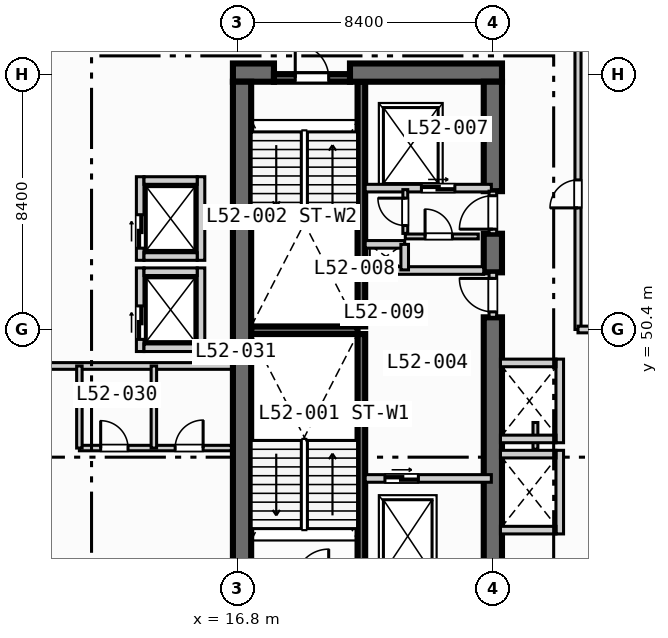
"""IFC4 building model, lengths in metres.
Left out: names, types, materials, properties, quantities, classifications, styles, units other than length and angle.
Written with IfcOpenShell. Run it as: python <this file> out.ifc"""

import sys

from ifc_helpers import new_model, si_unit, direction, frame, frame_2d, origin, place, context, subcontext, project, spatial, rectangle, extrude, element, fill, save


model = new_model("IFC4")
c1 = context("Model", 3, precision=1e-05, world=origin(), true_north=direction((0.0, 1.0)))
c2 = subcontext(c1, "Body", "Model", "MODEL_VIEW")
j1 = project(units=[si_unit("LENGTHUNIT", "METRE"), si_unit("PLANEANGLEUNIT", "RADIAN")], contexts=[c1])
p1 = place(None, origin())
s1 = spatial("IfcSite", under=j1, at=p1, CompositionType="ELEMENT")
p2 = place(p1, origin())
s2 = spatial("IfcBuilding", under=s1, at=p2, CompositionType="ELEMENT")
p3 = place(p2, frame((0.0, 0.0, 212.4)))
s3 = spatial("IfcBuildingStorey", under=s2, at=p3, CompositionType="ELEMENT", Elevation=212.4)
for number, where, z_axis, x_axis in (
    (1, (20.875, 42.2, 0.0), (0.0, 0.0, 1.0), (0.0, 1.0, 0.0)),
    (2, (20.875, 50.5, 0.0), (0.0, 0.0, 1.0), (0.0, 1.0, 0.0)),
):
    element("IfcWall", number, at=place(p3, frame(where, z_axis=z_axis, x_axis=x_axis)), inside=s3, PredefinedType="SOLIDWALL", context=c2, shape_type="SweptSolid", body=[
        extrude(rectangle(XDim=8.05, YDim=0.25, at=frame_2d((4.025, 0.0))), origin(), (0.0, 0.0, 1.0), 3.47),
    ])
p4 = place(p3, frame((17.25, 50.375, 0.0), z_axis=(0.0, 0.0, 1.0), x_axis=(1.0, 0.0, 0.0)))
e3 = element("IfcWall", 3, at=p4, inside=s3, PredefinedType="SOLIDWALL", context=c2, shape_type="SweptSolid", body=[
    extrude(rectangle(XDim=3.5, YDim=0.25, at=frame_2d((1.75, 0.0))), origin(), (0.0, 0.0, 1.0), 3.47),
])
p5 = place(p3, frame((16.65, 58.85, 0.0), z_axis=(0.0, 0.0, 1.0), x_axis=(1.0, 0.0, 0.0)))
e4 = element("IfcWall", 4, at=p5, inside=s3, PredefinedType="SHEAR", context=c2, shape_type="SweptSolid", body=[
    extrude(rectangle(XDim=1.35, YDim=0.6, at=frame_2d((0.675, 0.0))), origin(), (0.0, 0.0, 1.0), 3.47),
])
p6 = place(p3, frame((20.5, 58.85, 0.0), z_axis=(0.0, 0.0, 1.0), x_axis=(1.0, 0.0, 0.0)))
e5 = element("IfcWall", 5, at=p6, inside=s3, PredefinedType="SHEAR", context=c2, shape_type="SweptSolid", body=[
    extrude(rectangle(XDim=5.0, YDim=0.6, at=frame_2d((2.5, 0.0))), origin(), (0.0, 0.0, 1.0), 3.47),
])
p7 = place(p3, frame((16.95, 42.2, 0.0), z_axis=(0.0, 0.0, 1.0), x_axis=(0.0, 1.0, 0.0)))
e6 = element("IfcWall", 6, at=p7, inside=s3, PredefinedType="SHEAR", context=c2, shape_type="SweptSolid", body=[
    extrude(rectangle(XDim=16.35, YDim=0.6, at=frame_2d((8.175, 0.0))), origin(), (0.0, 0.0, 1.0), 3.47),
])
p8 = place(p3, frame((25.2, 42.2, 0.0), z_axis=(0.0, 0.0, 1.0), x_axis=(0.0, 1.0, 0.0)))
e7 = element("IfcWall", 7, at=p8, inside=s3, PredefinedType="SHEAR", context=c2, shape_type="SweptSolid", body=[
    extrude(rectangle(XDim=8.6, YDim=0.6, at=frame_2d((4.3, 0.0))), origin(), (0.0, 0.0, 1.0), 3.47),
])
p9 = place(p3, frame((25.2, 52.28, 0.0), z_axis=(0.0, 0.0, 1.0), x_axis=(0.0, 1.0, 0.0)))
e8 = element("IfcWall", 8, at=p9, inside=s3, PredefinedType="SHEAR", context=c2, shape_type="SweptSolid", body=[
    extrude(rectangle(XDim=1.27, YDim=0.6, at=frame_2d((0.635, 0.0))), origin(), (0.0, 0.0, 1.0), 3.47),
])
p10 = place(p3, frame((25.2, 54.95, 0.0), z_axis=(0.0, 0.0, 1.0), x_axis=(0.0, 1.0, 0.0)))
e9 = element("IfcWall", 9, at=p10, inside=s3, PredefinedType="SHEAR", context=c2, shape_type="SweptSolid", body=[
    extrude(rectangle(XDim=3.6, YDim=0.6, at=frame_2d((1.8, 0.0))), origin(), (0.0, 0.0, 1.0), 3.47),
])
p11 = place(p3, frame((18.0, 58.675, 0.0), z_axis=(0.0, 0.0, 1.0), x_axis=(1.0, 0.0, 0.0)))
e10 = element("IfcWall", 10, at=p11, inside=s3, PredefinedType="SOLIDWALL", context=c2, shape_type="SweptSolid", body=[
    extrude(rectangle(XDim=2.5, YDim=0.25, at=frame_2d((1.25, 0.0))), origin(), (0.0, 0.0, 1.0), 3.47),
])
p12 = place(p11, frame((0.7, 0.0, 0.0)))
e11 = element("IfcOpeningElement", 11, at=p12, cuts=e10, PredefinedType="OPENING", context=c2, shape_type="SweptSolid", body=[
    extrude(rectangle(XDim=1.1, YDim=2.15, at=frame_2d((0.55, 1.075))), frame((0.0, 0.135, 0.0), z_axis=(0.0, -1.0, 0.0), x_axis=(1.0, 0.0, 0.0)), (0.0, 0.0, 1.0), 0.27),
])
p13 = place(p3, frame((21.0, 45.5, 0.0), z_axis=(0.0, 0.0, 1.0), x_axis=(1.0, 0.0, 0.0)))
e12 = element("IfcWall", 12, at=p13, inside=s3, PredefinedType="SOLIDWALL", context=c2, shape_type="SweptSolid", body=[
    extrude(rectangle(XDim=4.15, YDim=0.25, at=frame_2d((2.075, 0.0))), origin(), (0.0, 0.0, 1.0), 3.47),
])
p14 = place(p13, frame((0.65, 0.0, 0.0)))
e13 = element("IfcOpeningElement", 13, at=p14, cuts=e12, PredefinedType="OPENING", context=c2, shape_type="SweptSolid", body=[
    extrude(rectangle(XDim=1.1, YDim=2.15, at=frame_2d((0.55, 1.075))), frame((0.0, 0.135, 0.0), z_axis=(0.0, -1.0, 0.0), x_axis=(1.0, 0.0, 0.0)), (0.0, 0.0, 1.0), 0.27),
])
p15 = place(p3, frame((25.2, 50.8, 0.0), z_axis=(0.0, 0.0, 1.0), x_axis=(0.0, 1.0, 0.0)))
e14 = element("IfcWall", 14, at=p15, inside=s3, PredefinedType="SOLIDWALL", context=c2, shape_type="SweptSolid", body=[
    extrude(rectangle(XDim=1.48, YDim=0.25, at=frame_2d((0.74, 0.0))), origin(), (0.0, 0.0, 1.0), 3.47),
])
p16 = place(p15, frame((0.18, 0.0, 0.0)))
e15 = element("IfcOpeningElement", 15, at=p16, cuts=e14, PredefinedType="OPENING", context=c2, shape_type="SweptSolid", body=[
    extrude(rectangle(XDim=1.1, YDim=2.15, at=frame_2d((0.55, 1.075))), frame((0.0, 0.135, 0.0), z_axis=(0.0, -1.0, 0.0), x_axis=(1.0, 0.0, 0.0)), (0.0, 0.0, 1.0), 0.27),
])
p17 = place(p3, frame((21.0, 52.34, 0.0), z_axis=(0.0, 0.0, 1.0), x_axis=(1.0, 0.0, 0.0)))
e16 = element("IfcWall", 16, at=p17, inside=s3, PredefinedType="SOLIDWALL", context=c2, shape_type="SweptSolid", body=[
    extrude(rectangle(XDim=3.9, YDim=0.25, at=frame_2d((1.95, 0.0))), origin(), (0.0, 0.0, 1.0), 3.47),
])
p18 = place(p3, frame((21.0, 55.05, 0.0), z_axis=(0.0, 0.0, 1.0), x_axis=(1.0, 0.0, 0.0)))
e17 = element("IfcWall", 17, at=p18, inside=s3, PredefinedType="SOLIDWALL", context=c2, shape_type="SweptSolid", body=[
    extrude(rectangle(XDim=4.15, YDim=0.25, at=frame_2d((2.075, 0.0))), origin(), (0.0, 0.0, 1.0), 3.47),
])
p19 = place(p18, frame((1.85, 0.0, 0.0)))
e18 = element("IfcOpeningElement", 18, at=p19, cuts=e17, PredefinedType="OPENING", context=c2, shape_type="SweptSolid", body=[
    extrude(rectangle(XDim=1.1, YDim=2.15, at=frame_2d((0.55, 1.075))), frame((0.0, 0.135, 0.0), z_axis=(0.0, -1.0, 0.0), x_axis=(1.0, 0.0, 0.0)), (0.0, 0.0, 1.0), 0.27),
])
p20 = place(p3, frame((25.2, 53.55, 0.0), z_axis=(0.0, 0.0, 1.0), x_axis=(0.0, 1.0, 0.0)))
e19 = element("IfcWall", 19, at=p20, inside=s3, PredefinedType="SOLIDWALL", context=c2, shape_type="SweptSolid", body=[
    extrude(rectangle(XDim=1.4, YDim=0.25, at=frame_2d((0.7, 0.0))), origin(), (0.0, 0.0, 1.0), 3.47),
])
p21 = place(p20, frame((0.15, 0.0, 0.0)))
e20 = element("IfcOpeningElement", 20, at=p21, cuts=e19, PredefinedType="OPENING", context=c2, shape_type="SweptSolid", body=[
    extrude(rectangle(XDim=1.1, YDim=2.15, at=frame_2d((0.55, 1.075))), frame((0.0, 0.135, 0.0), z_axis=(0.0, -1.0, 0.0), x_axis=(1.0, 0.0, 0.0)), (0.0, 0.0, 1.0), 0.27),
])
p22 = place(p3, frame((21.0, 53.2, 0.0), z_axis=(0.0, 0.0, 1.0), x_axis=(1.0, 0.0, 0.0)))
e21 = element("IfcWall", 21, at=p22, inside=s3, PredefinedType="SOLIDWALL", context=c2, shape_type="SweptSolid", body=[
    extrude(rectangle(XDim=1.3, YDim=0.25, at=frame_2d((0.65, 0.0))), origin(), (0.0, 0.0, 1.0), 3.47),
])
p23 = place(p3, frame((22.3, 52.36, 0.0), z_axis=(0.0, 0.0, 1.0), x_axis=(0.0, 1.0, 0.0)))
e22 = element("IfcWall", 22, at=p23, inside=s3, PredefinedType="SOLIDWALL", context=c2, shape_type="SweptSolid", body=[
    extrude(rectangle(XDim=0.84, YDim=0.25, at=frame_2d((0.42, 0.0))), origin(), (0.0, 0.0, 1.0), 3.47),
])
p24 = place(p3, frame((22.32, 53.56, 0.0), z_axis=(0.0, 0.0, 1.0), x_axis=(0.0, 1.0, 0.0)))
e23 = element("IfcWall", 23, at=p24, inside=s3, PredefinedType="PARTITIONING", context=c2, shape_type="SweptSolid", body=[
    extrude(rectangle(XDim=1.44, YDim=0.16, at=frame_2d((0.72, 0.0))), origin(), (0.0, 0.0, 1.0), 3.47),
])
p25 = place(p24, frame((0.26, 0.0, 0.0)))
e24 = element("IfcOpeningElement", 24, at=p25, cuts=e23, PredefinedType="OPENING", context=c2, shape_type="SweptSolid", body=[
    extrude(rectangle(XDim=0.9, YDim=2.1, at=frame_2d((0.45, 1.05))), frame((0.0, 0.09, 0.0), z_axis=(0.0, -1.0, 0.0), x_axis=(1.0, 0.0, 0.0)), (0.0, 0.0, 1.0), 0.18),
])
p26 = place(p3, frame((22.32, 53.46, 0.0), z_axis=(0.0, 0.0, 1.0), x_axis=(1.0, 0.0, 0.0)))
e25 = element("IfcWall", 25, at=p26, inside=s3, PredefinedType="PARTITIONING", context=c2, shape_type="SweptSolid", body=[
    extrude(rectangle(XDim=2.4, YDim=0.16, at=frame_2d((1.2, 0.0))), origin(), (0.0, 0.0, 1.0), 3.47),
])
p27 = place(p26, frame((0.65, 0.0, 0.0)))
e26 = element("IfcOpeningElement", 26, at=p27, cuts=e25, PredefinedType="OPENING", context=c2, shape_type="SweptSolid", body=[
    extrude(rectangle(XDim=0.9, YDim=2.1, at=frame_2d((0.45, 1.05))), frame((0.0, 0.09, 0.0), z_axis=(0.0, -1.0, 0.0), x_axis=(1.0, 0.0, 0.0)), (0.0, 0.0, 1.0), 0.18),
])
p28 = place(p3, frame((13.6, 49.675, 0.0), z_axis=(0.0, 0.0, 1.0), x_axis=(0.0, 1.0, 0.0)))
e27 = element("IfcWall", 27, at=p28, inside=s3, PredefinedType="SOLIDWALL", context=c2, shape_type="SweptSolid", body=[
    extrude(rectangle(XDim=2.75, YDim=0.25, at=frame_2d((1.375, 0.0))), origin(), (0.0, 0.0, 1.0), 3.47),
])
p29 = place(p28, frame((0.4, 0.0, 0.0)))
e28 = element("IfcOpeningElement", 28, at=p29, cuts=e27, PredefinedType="OPENING", context=c2, shape_type="SweptSolid", body=[
    extrude(rectangle(XDim=1.1, YDim=2.15, at=frame_2d((0.55, 1.075))), frame((0.0, 0.135, 0.0), z_axis=(0.0, -1.0, 0.0), x_axis=(1.0, 0.0, 0.0)), (0.0, 0.0, 1.0), 0.27),
])
p30 = place(p3, frame((15.6, 49.675, 0.0), z_axis=(0.0, 0.0, 1.0), x_axis=(0.0, 1.0, 0.0)))
e29 = element("IfcWall", 29, at=p30, inside=s3, PredefinedType="SOLIDWALL", context=c2, shape_type="SweptSolid", body=[
    extrude(rectangle(XDim=2.75, YDim=0.25, at=frame_2d((1.375, 0.0))), origin(), (0.0, 0.0, 1.0), 3.47),
])
for number, where, z_axis, x_axis in (
    (30, (13.725, 49.8, 0.0), (0.0, 0.0, 1.0), (1.0, 0.0, 0.0)),
    (31, (13.725, 52.3, 0.0), (0.0, 0.0, 1.0), (1.0, 0.0, 0.0)),
):
    element("IfcWall", number, at=place(p3, frame(where, z_axis=z_axis, x_axis=x_axis)), inside=s3, PredefinedType="SOLIDWALL", context=c2, shape_type="SweptSolid", body=[
        extrude(rectangle(XDim=1.75, YDim=0.25, at=frame_2d((0.875, 0.0))), origin(), (0.0, 0.0, 1.0), 3.47),
    ])
p31 = place(p3, frame((13.6, 52.675, 0.0), z_axis=(0.0, 0.0, 1.0), x_axis=(0.0, 1.0, 0.0)))
e32 = element("IfcWall", 32, at=p31, inside=s3, PredefinedType="SOLIDWALL", context=c2, shape_type="SweptSolid", body=[
    extrude(rectangle(XDim=2.75, YDim=0.25, at=frame_2d((1.375, 0.0))), origin(), (0.0, 0.0, 1.0), 3.47),
])
p32 = place(p31, frame((0.4, 0.0, 0.0)))
e33 = element("IfcOpeningElement", 33, at=p32, cuts=e32, PredefinedType="OPENING", context=c2, shape_type="SweptSolid", body=[
    extrude(rectangle(XDim=1.1, YDim=2.15, at=frame_2d((0.55, 1.075))), frame((0.0, 0.135, 0.0), z_axis=(0.0, -1.0, 0.0), x_axis=(1.0, 0.0, 0.0)), (0.0, 0.0, 1.0), 0.27),
])
p33 = place(p3, frame((15.6, 52.675, 0.0), z_axis=(0.0, 0.0, 1.0), x_axis=(0.0, 1.0, 0.0)))
e34 = element("IfcWall", 34, at=p33, inside=s3, PredefinedType="SOLIDWALL", context=c2, shape_type="SweptSolid", body=[
    extrude(rectangle(XDim=2.75, YDim=0.25, at=frame_2d((1.375, 0.0))), origin(), (0.0, 0.0, 1.0), 3.47),
])
for number, where, z_axis, x_axis in (
    (35, (13.725, 52.8, 0.0), (0.0, 0.0, 1.0), (1.0, 0.0, 0.0)),
    (36, (13.725, 55.3, 0.0), (0.0, 0.0, 1.0), (1.0, 0.0, 0.0)),
):
    element("IfcWall", number, at=place(p3, frame(where, z_axis=z_axis, x_axis=x_axis)), inside=s3, PredefinedType="SOLIDWALL", context=c2, shape_type="SweptSolid", body=[
        extrude(rectangle(XDim=1.75, YDim=0.25, at=frame_2d((0.875, 0.0))), origin(), (0.0, 0.0, 1.0), 3.47),
    ])
p34 = place(p3, frame((27.4, 43.675, 0.0), z_axis=(0.0, 0.0, 1.0), x_axis=(0.0, 1.0, 0.0)))
e37 = element("IfcWall", 37, at=p34, inside=s3, PredefinedType="SOLIDWALL", context=c2, shape_type="SweptSolid", body=[
    extrude(rectangle(XDim=2.75, YDim=0.25, at=frame_2d((1.375, 0.0))), origin(), (0.0, 0.0, 1.0), 3.47),
])
for number, where, z_axis, x_axis in (
    (38, (25.45, 43.8, 0.0), (0.0, 0.0, 1.0), (1.0, 0.0, 0.0)),
    (39, (25.45, 46.3, 0.0), (0.0, 0.0, 1.0), (1.0, 0.0, 0.0)),
):
    element("IfcWall", number, at=place(p3, frame(where, z_axis=z_axis, x_axis=x_axis)), inside=s3, PredefinedType="SOLIDWALL", context=c2, shape_type="SweptSolid", body=[
        extrude(rectangle(XDim=1.825, YDim=0.25, at=frame_2d((0.913, 0.0))), origin(), (0.0, 0.0, 1.0), 3.47),
    ])
p35 = place(p3, frame((26.6, 46.46, 0.0), z_axis=(0.0, 0.0, 1.0), x_axis=(0.0, 1.0, 0.0)))
e40 = element("IfcWall", 40, at=p35, inside=s3, PredefinedType="PARTITIONING", context=c2, shape_type="SweptSolid", body=[
    extrude(rectangle(XDim=0.88, YDim=0.16, at=frame_2d((0.44, 0.0))), origin(), (0.0, 0.0, 1.0), 3.47),
])
p36 = place(p3, frame((27.4, 46.675, 0.0), z_axis=(0.0, 0.0, 1.0), x_axis=(0.0, 1.0, 0.0)))
e41 = element("IfcWall", 41, at=p36, inside=s3, PredefinedType="SOLIDWALL", context=c2, shape_type="SweptSolid", body=[
    extrude(rectangle(XDim=2.75, YDim=0.25, at=frame_2d((1.375, 0.0))), origin(), (0.0, 0.0, 1.0), 3.47),
])
for number, where, z_axis, x_axis in (
    (42, (25.45, 46.8, 0.0), (0.0, 0.0, 1.0), (1.0, 0.0, 0.0)),
    (43, (25.45, 49.3, 0.0), (0.0, 0.0, 1.0), (1.0, 0.0, 0.0)),
):
    element("IfcWall", number, at=place(p3, frame(where, z_axis=z_axis, x_axis=x_axis)), inside=s3, PredefinedType="SOLIDWALL", context=c2, shape_type="SweptSolid", body=[
        extrude(rectangle(XDim=1.825, YDim=0.25, at=frame_2d((0.913, 0.0))), origin(), (0.0, 0.0, 1.0), 3.47),
    ])
p37 = place(p3, frame((0.35, 49.2, 0.0), z_axis=(0.0, 0.0, 1.0), x_axis=(1.0, 0.0, 0.0)))
e44 = element("IfcWall", 44, at=p37, inside=s3, PredefinedType="PARTITIONING", context=c2, shape_type="SweptSolid", body=[
    extrude(rectangle(XDim=16.25, YDim=0.22, at=frame_2d((8.125, 0.0))), origin(), (0.0, 0.0, 1.0), 3.47),
])
p38 = place(p3, frame((11.6, 46.5, 0.0), z_axis=(0.0, 0.0, 1.0), x_axis=(1.0, 0.0, 0.0)))
e45 = element("IfcWall", 45, at=p38, inside=s3, PredefinedType="PLUMBINGWALL", context=c2, shape_type="SweptSolid", body=[
    extrude(rectangle(XDim=5.0, YDim=0.18, at=frame_2d((2.5, 0.0))), origin(), (0.0, 0.0, 1.0), 3.47),
])
p39 = place(p38, frame((0.7, 0.0, 0.0)))
e46 = element("IfcOpeningElement", 46, at=p39, cuts=e45, PredefinedType="OPENING", context=c2, shape_type="SweptSolid", body=[
    extrude(rectangle(XDim=0.9, YDim=2.1, at=frame_2d((0.45, 1.05))), frame((0.0, 0.1, 0.0), z_axis=(0.0, -1.0, 0.0), x_axis=(1.0, 0.0, 0.0)), (0.0, 0.0, 1.0), 0.2),
])
p40 = place(p38, frame((3.15, 0.0, 0.0)))
e47 = element("IfcOpeningElement", 47, at=p40, cuts=e45, PredefinedType="OPENING", context=c2, shape_type="SweptSolid", body=[
    extrude(rectangle(XDim=0.92, YDim=2.1, at=frame_2d((0.46, 1.05))), frame((0.0, 0.1, 0.0), z_axis=(0.0, -1.0, 0.0), x_axis=(1.0, 0.0, 0.0)), (0.0, 0.0, 1.0), 0.2),
])
for number, where, z_axis, x_axis in (
    (48, (11.6, 46.5, 0.0), (0.0, 0.0, 1.0), (0.0, 1.0, 0.0)),
    (49, (14.05, 46.5, 0.0), (0.0, 0.0, 1.0), (0.0, 1.0, 0.0)),
):
    element("IfcWall", number, at=place(p3, frame(where, z_axis=z_axis, x_axis=x_axis)), inside=s3, PredefinedType="PLUMBINGWALL", context=c2, shape_type="SweptSolid", body=[
        extrude(rectangle(XDim=2.7, YDim=0.18, at=frame_2d((1.35, 0.0))), origin(), (0.0, 0.0, 1.0), 3.47),
    ])
p41 = place(p3, frame((28.0, 50.4, 0.0), z_axis=(0.0, 0.0, 1.0), x_axis=(0.0, 1.0, 0.0)))
e50 = element("IfcWall", 50, at=p41, inside=s3, PredefinedType="PARTITIONING", context=c2, shape_type="SweptSolid", body=[
    extrude(rectangle(XDim=21.8, YDim=0.2, at=frame_2d((10.9, 0.0))), origin(), (0.0, 0.0, 1.0), 3.47),
])
p42 = place(p41, frame((4.0, 0.0, 0.0)))
e51 = element("IfcOpeningElement", 51, at=p42, cuts=e50, PredefinedType="OPENING", context=c2, shape_type="SweptSolid", body=[
    extrude(rectangle(XDim=0.92, YDim=2.1, at=frame_2d((0.46, 1.05))), frame((0.0, 0.11, 0.0), z_axis=(0.0, -1.0, 0.0), x_axis=(1.0, 0.0, 0.0)), (0.0, 0.0, 1.0), 0.22),
])
p43 = place(p3, frame((28.0, 50.4, 0.0), z_axis=(0.0, 0.0, 1.0), x_axis=(1.0, 0.0, 0.0)))
e52 = element("IfcWall", 52, at=p43, inside=s3, PredefinedType="PARTITIONING", context=c2, shape_type="SweptSolid", body=[
    extrude(rectangle(XDim=5.3, YDim=0.22, at=frame_2d((2.65, 0.0))), origin(), (0.0, 0.0, 1.0), 2.931),
])
p44 = place(p12, origin())
e53 = element("IfcDoor", 53, at=p44, inside=s3, OperationType="SINGLE_SWING_LEFT", PredefinedType="DOOR", context=c2, shape_type="SweptSolid", body=[
    extrude(rectangle(XDim=1.1, YDim=2.15, at=frame_2d((0.55, 1.075))), frame((0.0, 0.025, 0.0), z_axis=(0.0, -1.0, 0.0), x_axis=(1.0, 0.0, 0.0)), (0.0, 0.0, 1.0), 0.05),
])
fill(e11, e53)
p45 = place(p14, origin())
e54 = element("IfcDoor", 54, at=p45, inside=s3, OperationType="SLIDING_TO_LEFT", PredefinedType="DOOR", context=c2, shape_type="SweptSolid", body=[
    extrude(rectangle(XDim=1.1, YDim=2.15, at=frame_2d((0.55, 1.075))), frame((0.0, 0.025, 0.0), z_axis=(0.0, -1.0, 0.0), x_axis=(1.0, 0.0, 0.0)), (0.0, 0.0, 1.0), 0.05),
])
fill(e13, e54)
p46 = place(p16, origin())
e55 = element("IfcDoor", 55, at=p46, inside=s3, OperationType="SINGLE_SWING_RIGHT", PredefinedType="DOOR", context=c2, shape_type="SweptSolid", body=[
    extrude(rectangle(XDim=1.1, YDim=2.15, at=frame_2d((0.55, 1.075))), frame((0.0, 0.025, 0.0), z_axis=(0.0, -1.0, 0.0), x_axis=(1.0, 0.0, 0.0)), (0.0, 0.0, 1.0), 0.05),
])
fill(e15, e55)
p47 = place(p19, origin())
e56 = element("IfcDoor", 56, at=p47, inside=s3, OperationType="SLIDING_TO_LEFT", PredefinedType="DOOR", context=c2, shape_type="SweptSolid", body=[
    extrude(rectangle(XDim=1.1, YDim=2.15, at=frame_2d((0.55, 1.075))), frame((0.0, 0.025, 0.0), z_axis=(0.0, -1.0, 0.0), x_axis=(1.0, 0.0, 0.0)), (0.0, 0.0, 1.0), 0.05),
])
fill(e18, e56)
p48 = place(p21, origin())
e57 = element("IfcDoor", 57, at=p48, inside=s3, OperationType="SINGLE_SWING_LEFT", PredefinedType="DOOR", context=c2, shape_type="SweptSolid", body=[
    extrude(rectangle(XDim=1.1, YDim=2.15, at=frame_2d((0.55, 1.075))), frame((0.0, 0.025, 0.0), z_axis=(0.0, -1.0, 0.0), x_axis=(1.0, 0.0, 0.0)), (0.0, 0.0, 1.0), 0.05),
])
fill(e20, e57)
p49 = place(p25, origin())
e58 = element("IfcDoor", 58, at=p49, inside=s3, OperationType="SINGLE_SWING_RIGHT", PredefinedType="DOOR", context=c2, shape_type="SweptSolid", body=[
    extrude(rectangle(XDim=0.9, YDim=2.1, at=frame_2d((0.45, 1.05))), frame((0.0, 0.025, 0.0), z_axis=(0.0, -1.0, 0.0), x_axis=(1.0, 0.0, 0.0)), (0.0, 0.0, 1.0), 0.05),
])
fill(e24, e58)
p50 = place(p27, origin())
e59 = element("IfcDoor", 59, at=p50, inside=s3, OperationType="SINGLE_SWING_LEFT", PredefinedType="DOOR", context=c2, shape_type="SweptSolid", body=[
    extrude(rectangle(XDim=0.9, YDim=2.1, at=frame_2d((0.45, 1.05))), frame((0.0, 0.025, 0.0), z_axis=(0.0, -1.0, 0.0), x_axis=(1.0, 0.0, 0.0)), (0.0, 0.0, 1.0), 0.05),
])
fill(e26, e59)
p51 = place(p29, origin())
e60 = element("IfcDoor", 60, at=p51, inside=s3, OperationType="SLIDING_TO_LEFT", PredefinedType="DOOR", context=c2, shape_type="SweptSolid", body=[
    extrude(rectangle(XDim=1.1, YDim=2.15, at=frame_2d((0.55, 1.075))), frame((0.0, 0.025, 0.0), z_axis=(0.0, -1.0, 0.0), x_axis=(1.0, 0.0, 0.0)), (0.0, 0.0, 1.0), 0.05),
])
fill(e28, e60)
p52 = place(p32, origin())
e61 = element("IfcDoor", 61, at=p52, inside=s3, OperationType="SLIDING_TO_LEFT", PredefinedType="DOOR", context=c2, shape_type="SweptSolid", body=[
    extrude(rectangle(XDim=1.1, YDim=2.15, at=frame_2d((0.55, 1.075))), frame((0.0, 0.025, 0.0), z_axis=(0.0, -1.0, 0.0), x_axis=(1.0, 0.0, 0.0)), (0.0, 0.0, 1.0), 0.05),
])
fill(e33, e61)
p53 = place(p39, origin())
e62 = element("IfcDoor", 62, at=p53, inside=s3, OperationType="SINGLE_SWING_LEFT", PredefinedType="DOOR", context=c2, shape_type="SweptSolid", body=[
    extrude(rectangle(XDim=0.9, YDim=2.1, at=frame_2d((0.45, 1.05))), frame((0.0, 0.025, 0.0), z_axis=(0.0, -1.0, 0.0), x_axis=(1.0, 0.0, 0.0)), (0.0, 0.0, 1.0), 0.05),
])
fill(e46, e62)
p54 = place(p40, origin())
e63 = element("IfcDoor", 63, at=p54, inside=s3, OperationType="SINGLE_SWING_RIGHT", PredefinedType="DOOR", context=c2, shape_type="SweptSolid", body=[
    extrude(rectangle(XDim=0.92, YDim=2.1, at=frame_2d((0.46, 1.05))), frame((0.0, 0.025, 0.0), z_axis=(0.0, -1.0, 0.0), x_axis=(1.0, 0.0, 0.0)), (0.0, 0.0, 1.0), 0.05),
])
fill(e47, e63)
p55 = place(p42, origin())
e64 = element("IfcDoor", 64, at=p55, inside=s3, OperationType="SINGLE_SWING_LEFT", PredefinedType="DOOR", context=c2, shape_type="SweptSolid", body=[
    extrude(rectangle(XDim=0.92, YDim=2.1, at=frame_2d((0.46, 1.05))), frame((0.0, 0.025, 0.0), z_axis=(0.0, -1.0, 0.0), x_axis=(1.0, 0.0, 0.0)), (0.0, 0.0, 1.0), 0.05),
])
fill(e51, e64)
save(model, sys.argv[1])
